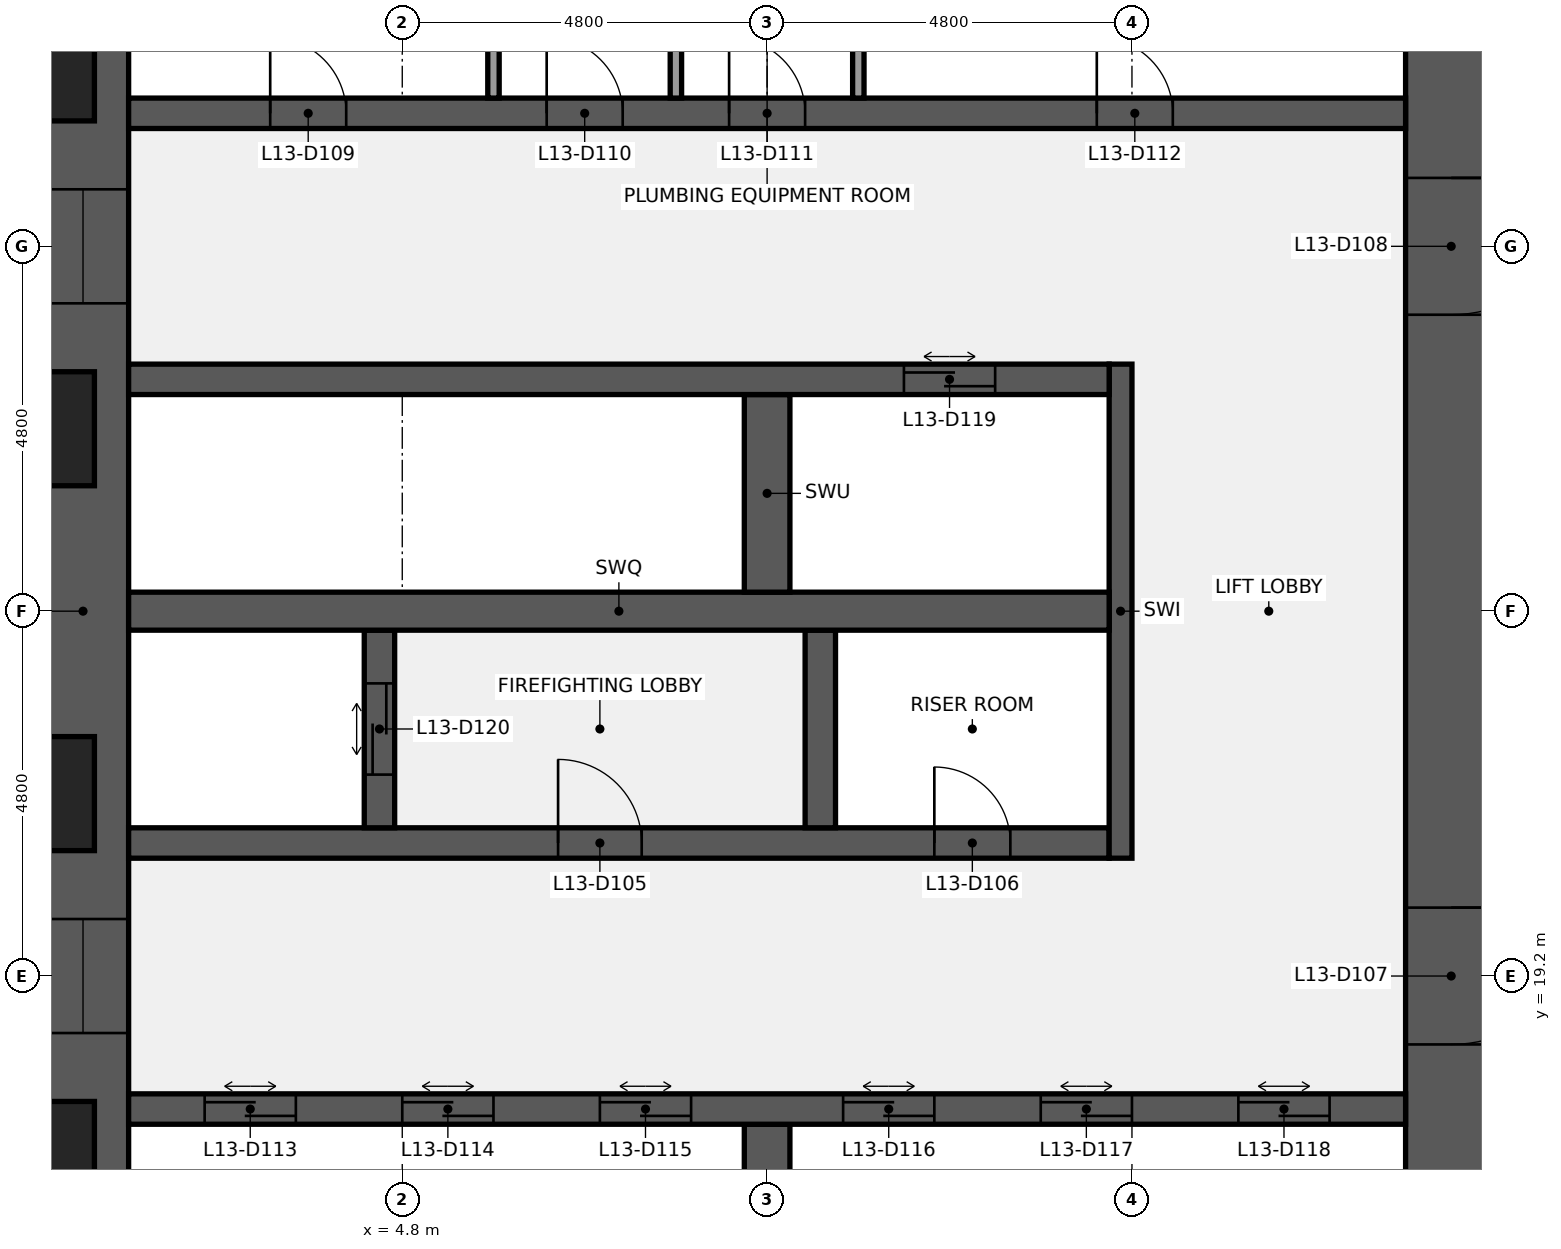
"""IFC4 building model, lengths in metres.
Left out: names, types, materials, properties, quantities, classifications, styles, units other than length and angle.
Written with IfcOpenShell. Run it as: python <this file> out.ifc"""

import sys

from ifc_helpers import new_model, si_unit, direction, frame, frame_2d, origin, place, context, subcontext, project, spatial, rectangle, extrude, element, fill, save


model = new_model("IFC4")
c1 = context("Model", 3, precision=1e-05, world=origin(), true_north=direction((0.0, 1.0)))
c2 = subcontext(c1, "Body", "Model", "MODEL_VIEW")
j1 = project(units=[si_unit("LENGTHUNIT", "METRE"), si_unit("PLANEANGLEUNIT", "RADIAN")], contexts=[c1])
p1 = place(None, origin())
s1 = spatial("IfcSite", under=j1, at=p1, CompositionType="ELEMENT")
p2 = place(p1, origin())
s2 = spatial("IfcBuilding", under=s1, at=p2, CompositionType="ELEMENT")
p3 = place(p2, frame((0.0, 0.0, 63.0)))
s3 = spatial("IfcBuildingStorey", under=s2, at=p3, CompositionType="ELEMENT", Elevation=63.0)
p4 = place(p3, frame((0.6, 9.6, 0.0), z_axis=(0.0, 0.0, 1.0), x_axis=(0.0, 1.0, 0.0)))
e1 = element("IfcWall", 1, at=p4, inside=s3, PredefinedType="SHEAR", context=c2, shape_type="SweptSolid", body=[
    extrude(rectangle(XDim=28.8, YDim=1.2, at=frame_2d((14.4, 0.0))), origin(), (0.0, 0.0, 1.0), 3.84),
])
p5 = place(p4, frame((8.85, 0.0, 0.9)))
e2 = element("IfcOpeningElement", 2, at=p5, cuts=e1, PredefinedType="OPENING", context=c2, shape_type="SweptSolid", body=[
    extrude(rectangle(XDim=1.5, YDim=1.5, at=frame_2d((0.75, 0.75))), frame((0.0, 0.61, 0.0), z_axis=(0.0, -1.0, 0.0), x_axis=(1.0, 0.0, 0.0)), (0.0, 0.0, 1.0), 1.22),
])
p6 = place(p4, frame((18.45, 0.0, 0.9)))
e3 = element("IfcOpeningElement", 3, at=p6, cuts=e1, PredefinedType="OPENING", context=c2, shape_type="SweptSolid", body=[
    extrude(rectangle(XDim=1.5, YDim=1.5, at=frame_2d((0.75, 0.75))), frame((0.0, 0.61, 0.0), z_axis=(0.0, -1.0, 0.0), x_axis=(1.0, 0.0, 0.0)), (0.0, 0.0, 1.0), 1.22),
])
p7 = place(p3, frame((18.6, 38.4, 0.0), z_axis=(0.0, 0.0, 1.0), x_axis=(0.0, -1.0, 0.0)))
e4 = element("IfcWall", 4, at=p7, inside=s3, PredefinedType="SHEAR", context=c2, shape_type="SweptSolid", body=[
    extrude(rectangle(XDim=28.8, YDim=1.2, at=frame_2d((14.4, 0.0))), origin(), (0.0, 0.0, 1.0), 3.84),
])
p8 = place(p7, frame((18.3, 0.0, 0.0)))
e5 = element("IfcOpeningElement", 5, at=p8, cuts=e4, PredefinedType="OPENING", context=c2, shape_type="SweptSolid", body=[
    extrude(rectangle(XDim=1.8, YDim=2.1, at=frame_2d((0.9, 1.05))), frame((0.0, 0.61, 0.0), z_axis=(0.0, -1.0, 0.0), x_axis=(1.0, 0.0, 0.0)), (0.0, 0.0, 1.0), 1.22),
])
p9 = place(p7, frame((8.7, 0.0, 0.0)))
e6 = element("IfcOpeningElement", 6, at=p9, cuts=e4, PredefinedType="OPENING", context=c2, shape_type="SweptSolid", body=[
    extrude(rectangle(XDim=1.8, YDim=2.1, at=frame_2d((0.9, 1.05))), frame((0.0, 0.61, 0.0), z_axis=(0.0, -1.0, 0.0), x_axis=(1.0, 0.0, 0.0)), (0.0, 0.0, 1.0), 1.22),
])
p10 = place(p3, frame((9.6, 14.65, 0.0), z_axis=(0.0, 0.0, 1.0), x_axis=(0.0, 1.0, 0.0)))
e7 = element("IfcWall", 7, at=p10, inside=s3, PredefinedType="SHEAR", context=c2, shape_type="SweptSolid", body=[
    extrude(rectangle(XDim=2.6, YDim=0.6, at=frame_2d((1.3, 0.0))), origin(), (0.0, 0.0, 1.0), 3.84),
])
p11 = place(p3, frame((1.2, 17.45, 0.0), z_axis=(0.0, 0.0, 1.0), x_axis=(1.0, 0.0, 0.0)))
e8 = element("IfcWall", 8, at=p11, inside=s3, PredefinedType="SHEAR", context=c2, shape_type="SweptSolid", body=[
    extrude(rectangle(XDim=16.8, YDim=0.4, at=frame_2d((8.4, 0.0))), origin(), (0.0, 0.0, 1.0), 3.84),
])
p12 = place(p11, frame((1.0, 0.0, 0.0)))
e9 = element("IfcOpeningElement", 9, at=p12, cuts=e8, PredefinedType="OPENING", context=c2, shape_type="SweptSolid", body=[
    extrude(rectangle(XDim=1.2, YDim=2.1, at=frame_2d((0.6, 1.05))), frame((0.0, 0.21, 0.0), z_axis=(0.0, -1.0, 0.0), x_axis=(1.0, 0.0, 0.0)), (0.0, 0.0, 1.0), 0.42),
])
p13 = place(p11, frame((3.6, 0.0, 0.0)))
e10 = element("IfcOpeningElement", 10, at=p13, cuts=e8, PredefinedType="OPENING", context=c2, shape_type="SweptSolid", body=[
    extrude(rectangle(XDim=1.2, YDim=2.1, at=frame_2d((0.6, 1.05))), frame((0.0, 0.21, 0.0), z_axis=(0.0, -1.0, 0.0), x_axis=(1.0, 0.0, 0.0)), (0.0, 0.0, 1.0), 0.42),
])
p14 = place(p11, frame((6.2, 0.0, 0.0)))
e11 = element("IfcOpeningElement", 11, at=p14, cuts=e8, PredefinedType="OPENING", context=c2, shape_type="SweptSolid", body=[
    extrude(rectangle(XDim=1.2, YDim=2.1, at=frame_2d((0.6, 1.05))), frame((0.0, 0.21, 0.0), z_axis=(0.0, -1.0, 0.0), x_axis=(1.0, 0.0, 0.0)), (0.0, 0.0, 1.0), 0.42),
])
p15 = place(p11, frame((9.4, 0.0, 0.0)))
e12 = element("IfcOpeningElement", 12, at=p15, cuts=e8, PredefinedType="OPENING", context=c2, shape_type="SweptSolid", body=[
    extrude(rectangle(XDim=1.2, YDim=2.1, at=frame_2d((0.6, 1.05))), frame((0.0, 0.21, 0.0), z_axis=(0.0, -1.0, 0.0), x_axis=(1.0, 0.0, 0.0)), (0.0, 0.0, 1.0), 0.42),
])
p16 = place(p11, frame((12.0, 0.0, 0.0)))
e13 = element("IfcOpeningElement", 13, at=p16, cuts=e8, PredefinedType="OPENING", context=c2, shape_type="SweptSolid", body=[
    extrude(rectangle(XDim=1.2, YDim=2.1, at=frame_2d((0.6, 1.05))), frame((0.0, 0.21, 0.0), z_axis=(0.0, -1.0, 0.0), x_axis=(1.0, 0.0, 0.0)), (0.0, 0.0, 1.0), 0.42),
])
p17 = place(p11, frame((14.6, 0.0, 0.0)))
e14 = element("IfcOpeningElement", 14, at=p17, cuts=e8, PredefinedType="OPENING", context=c2, shape_type="SweptSolid", body=[
    extrude(rectangle(XDim=1.2, YDim=2.1, at=frame_2d((0.6, 1.05))), frame((0.0, 0.21, 0.0), z_axis=(0.0, -1.0, 0.0), x_axis=(1.0, 0.0, 0.0)), (0.0, 0.0, 1.0), 0.42),
])
p18 = place(p3, frame((1.2, 20.95, 0.0), z_axis=(0.0, 0.0, 1.0), x_axis=(1.0, 0.0, 0.0)))
e15 = element("IfcWall", 15, at=p18, inside=s3, PredefinedType="SHEAR", context=c2, shape_type="SweptSolid", body=[
    extrude(rectangle(XDim=12.9, YDim=0.4, at=frame_2d((6.45, 0.0))), origin(), (0.0, 0.0, 1.0), 3.84),
])
p19 = place(p18, frame((5.65, 0.0, 0.0)))
e16 = element("IfcOpeningElement", 16, at=p19, cuts=e15, PredefinedType="OPENING", context=c2, shape_type="SweptSolid", body=[
    extrude(rectangle(XDim=1.1, YDim=2.1, at=frame_2d((0.55, 1.05))), frame((0.0, 0.21, 0.0), z_axis=(0.0, -1.0, 0.0), x_axis=(1.0, 0.0, 0.0)), (0.0, 0.0, 1.0), 0.42),
])
p20 = place(p18, frame((10.6, 0.0, 0.0)))
e17 = element("IfcOpeningElement", 17, at=p20, cuts=e15, PredefinedType="OPENING", context=c2, shape_type="SweptSolid", body=[
    extrude(rectangle(XDim=1.0, YDim=2.1, at=frame_2d((0.5, 1.05))), frame((0.0, 0.21, 0.0), z_axis=(0.0, -1.0, 0.0), x_axis=(1.0, 0.0, 0.0)), (0.0, 0.0, 1.0), 0.42),
])
p21 = place(p3, frame((14.25, 20.75, 0.0), z_axis=(0.0, 0.0, 1.0), x_axis=(0.0, 1.0, 0.0)))
e18 = element("IfcWall", 18, at=p21, inside=s3, PredefinedType="SHEAR", context=c2, shape_type="SweptSolid", body=[
    extrude(rectangle(XDim=6.5, YDim=0.3, at=frame_2d((3.25, 0.0))), origin(), (0.0, 0.0, 1.0), 3.84),
])
p22 = place(p3, frame((4.5, 21.15, 0.0), z_axis=(0.0, 0.0, 1.0), x_axis=(0.0, 1.0, 0.0)))
e19 = element("IfcWall", 19, at=p22, inside=s3, PredefinedType="SHEAR", context=c2, shape_type="SweptSolid", body=[
    extrude(rectangle(XDim=2.6, YDim=0.4, at=frame_2d((1.3, 0.0))), origin(), (0.0, 0.0, 1.0), 3.84),
])
p23 = place(p22, frame((0.7, 0.0, 0.0)))
e20 = element("IfcOpeningElement", 20, at=p23, cuts=e19, PredefinedType="OPENING", context=c2, shape_type="SweptSolid", body=[
    extrude(rectangle(XDim=1.2, YDim=2.1, at=frame_2d((0.6, 1.05))), frame((0.0, 0.21, 0.0), z_axis=(0.0, -1.0, 0.0), x_axis=(1.0, 0.0, 0.0)), (0.0, 0.0, 1.0), 0.42),
])
p24 = place(p3, frame((10.3, 21.15, 0.0), z_axis=(0.0, 0.0, 1.0), x_axis=(0.0, 1.0, 0.0)))
e21 = element("IfcWall", 21, at=p24, inside=s3, PredefinedType="SHEAR", context=c2, shape_type="SweptSolid", body=[
    extrude(rectangle(XDim=2.6, YDim=0.4, at=frame_2d((1.3, 0.0))), origin(), (0.0, 0.0, 1.0), 3.84),
])
p25 = place(p3, frame((1.2, 24.0, 0.0), z_axis=(0.0, 0.0, 1.0), x_axis=(1.0, 0.0, 0.0)))
e22 = element("IfcWall", 22, at=p25, inside=s3, PredefinedType="SHEAR", context=c2, shape_type="SweptSolid", body=[
    extrude(rectangle(XDim=12.9, YDim=0.5, at=frame_2d((6.45, 0.0))), origin(), (0.0, 0.0, 1.0), 3.84),
])
p26 = place(p3, frame((9.6, 24.25, 0.0), z_axis=(0.0, 0.0, 1.0), x_axis=(0.0, 1.0, 0.0)))
e23 = element("IfcWall", 23, at=p26, inside=s3, PredefinedType="SHEAR", context=c2, shape_type="SweptSolid", body=[
    extrude(rectangle(XDim=2.6, YDim=0.6, at=frame_2d((1.3, 0.0))), origin(), (0.0, 0.0, 1.0), 3.84),
])
p27 = place(p3, frame((1.2, 27.05, 0.0), z_axis=(0.0, 0.0, 1.0), x_axis=(1.0, 0.0, 0.0)))
e24 = element("IfcWall", 24, at=p27, inside=s3, PredefinedType="SHEAR", context=c2, shape_type="SweptSolid", body=[
    extrude(rectangle(XDim=12.9, YDim=0.4, at=frame_2d((6.45, 0.0))), origin(), (0.0, 0.0, 1.0), 3.84),
])
p28 = place(p27, frame((10.2, 0.0, 0.0)))
e25 = element("IfcOpeningElement", 25, at=p28, cuts=e24, PredefinedType="OPENING", context=c2, shape_type="SweptSolid", body=[
    extrude(rectangle(XDim=1.2, YDim=2.1, at=frame_2d((0.6, 1.05))), frame((0.0, 0.21, 0.0), z_axis=(0.0, -1.0, 0.0), x_axis=(1.0, 0.0, 0.0)), (0.0, 0.0, 1.0), 0.42),
])
p29 = place(p3, frame((1.2, 30.55, 0.0), z_axis=(0.0, 0.0, 1.0), x_axis=(1.0, 0.0, 0.0)))
e26 = element("IfcWall", 26, at=p29, inside=s3, PredefinedType="SHEAR", context=c2, shape_type="SweptSolid", body=[
    extrude(rectangle(XDim=16.8, YDim=0.4, at=frame_2d((8.4, 0.0))), origin(), (0.0, 0.0, 1.0), 3.84),
])
p30 = place(p29, frame((1.863, 0.0, 0.0)))
e27 = element("IfcOpeningElement", 27, at=p30, cuts=e26, PredefinedType="OPENING", context=c2, shape_type="SweptSolid", body=[
    extrude(rectangle(XDim=1.0, YDim=2.1, at=frame_2d((0.5, 1.05))), frame((0.0, 0.21, 0.0), z_axis=(0.0, -1.0, 0.0), x_axis=(1.0, 0.0, 0.0)), (0.0, 0.0, 1.0), 0.42),
])
p31 = place(p29, frame((5.5, 0.0, 0.0)))
e28 = element("IfcOpeningElement", 28, at=p31, cuts=e26, PredefinedType="OPENING", context=c2, shape_type="SweptSolid", body=[
    extrude(rectangle(XDim=1.0, YDim=2.1, at=frame_2d((0.5, 1.05))), frame((0.0, 0.21, 0.0), z_axis=(0.0, -1.0, 0.0), x_axis=(1.0, 0.0, 0.0)), (0.0, 0.0, 1.0), 0.42),
])
p32 = place(p29, frame((7.9, 0.0, 0.0)))
e29 = element("IfcOpeningElement", 29, at=p32, cuts=e26, PredefinedType="OPENING", context=c2, shape_type="SweptSolid", body=[
    extrude(rectangle(XDim=1.0, YDim=2.1, at=frame_2d((0.5, 1.05))), frame((0.0, 0.21, 0.0), z_axis=(0.0, -1.0, 0.0), x_axis=(1.0, 0.0, 0.0)), (0.0, 0.0, 1.0), 0.42),
])
p33 = place(p29, frame((12.738, 0.0, 0.0)))
e30 = element("IfcOpeningElement", 30, at=p33, cuts=e26, PredefinedType="OPENING", context=c2, shape_type="SweptSolid", body=[
    extrude(rectangle(XDim=1.0, YDim=2.1, at=frame_2d((0.5, 1.05))), frame((0.0, 0.21, 0.0), z_axis=(0.0, -1.0, 0.0), x_axis=(1.0, 0.0, 0.0)), (0.0, 0.0, 1.0), 0.42),
])
for number, where, z_axis, x_axis in (
    (31, (6.0, 30.75, 0.0), (0.0, 0.0, 1.0), (0.0, 1.0, 0.0)),
    (32, (8.4, 30.75, 0.0), (0.0, 0.0, 1.0), (0.0, 1.0, 0.0)),
    (33, (10.8, 30.75, 0.0), (0.0, 0.0, 1.0), (0.0, 1.0, 0.0)),
):
    element("IfcWall", number, at=place(p3, frame(where, z_axis=z_axis, x_axis=x_axis)), inside=s3, PredefinedType="PARTITIONING", context=c2, shape_type="SweptSolid", body=[
        extrude(rectangle(XDim=2.6, YDim=0.15, at=frame_2d((1.3, 0.0))), origin(), (0.0, 0.0, 1.0), 3.84),
    ])
p34 = place(p19, origin())
e34 = element("IfcDoor", 34, at=p34, inside=s3, OperationType="SINGLE_SWING_LEFT", PredefinedType="DOOR", context=c2, shape_type="SweptSolid", body=[
    extrude(rectangle(XDim=1.1, YDim=2.1, at=frame_2d((0.55, 1.05))), frame((0.0, 0.025, 0.0), z_axis=(0.0, -1.0, 0.0), x_axis=(1.0, 0.0, 0.0)), (0.0, 0.0, 1.0), 0.05),
])
fill(e16, e34)
p35 = place(p20, origin())
e35 = element("IfcDoor", 35, at=p35, inside=s3, OperationType="SINGLE_SWING_LEFT", PredefinedType="DOOR", context=c2, shape_type="SweptSolid", body=[
    extrude(rectangle(XDim=1.0, YDim=2.1, at=frame_2d((0.5, 1.05))), frame((0.0, 0.025, 0.0), z_axis=(0.0, -1.0, 0.0), x_axis=(1.0, 0.0, 0.0)), (0.0, 0.0, 1.0), 0.05),
])
fill(e17, e35)
p36 = place(p8, origin())
e36 = element("IfcDoor", 36, at=p36, inside=s3, OperationType="DOUBLE_DOOR_SINGLE_SWING", PredefinedType="DOOR", context=c2, shape_type="SweptSolid", body=[
    extrude(rectangle(XDim=1.8, YDim=2.1, at=frame_2d((0.9, 1.05))), frame((0.0, 0.025, 0.0), z_axis=(0.0, -1.0, 0.0), x_axis=(1.0, 0.0, 0.0)), (0.0, 0.0, 1.0), 0.05),
])
fill(e5, e36)
p37 = place(p9, origin())
e37 = element("IfcDoor", 37, at=p37, inside=s3, OperationType="DOUBLE_DOOR_SINGLE_SWING", PredefinedType="DOOR", context=c2, shape_type="SweptSolid", body=[
    extrude(rectangle(XDim=1.8, YDim=2.1, at=frame_2d((0.9, 1.05))), frame((0.0, 0.025, 0.0), z_axis=(0.0, -1.0, 0.0), x_axis=(1.0, 0.0, 0.0)), (0.0, 0.0, 1.0), 0.05),
])
fill(e6, e37)
p38 = place(p30, origin())
e38 = element("IfcDoor", 38, at=p38, inside=s3, OperationType="SINGLE_SWING_LEFT", PredefinedType="DOOR", context=c2, shape_type="SweptSolid", body=[
    extrude(rectangle(XDim=1.0, YDim=2.1, at=frame_2d((0.5, 1.05))), frame((0.0, 0.025, 0.0), z_axis=(0.0, -1.0, 0.0), x_axis=(1.0, 0.0, 0.0)), (0.0, 0.0, 1.0), 0.05),
])
fill(e27, e38)
p39 = place(p31, origin())
e39 = element("IfcDoor", 39, at=p39, inside=s3, OperationType="SINGLE_SWING_LEFT", PredefinedType="DOOR", context=c2, shape_type="SweptSolid", body=[
    extrude(rectangle(XDim=1.0, YDim=2.1, at=frame_2d((0.5, 1.05))), frame((0.0, 0.025, 0.0), z_axis=(0.0, -1.0, 0.0), x_axis=(1.0, 0.0, 0.0)), (0.0, 0.0, 1.0), 0.05),
])
fill(e28, e39)
p40 = place(p32, origin())
e40 = element("IfcDoor", 40, at=p40, inside=s3, OperationType="SINGLE_SWING_LEFT", PredefinedType="DOOR", context=c2, shape_type="SweptSolid", body=[
    extrude(rectangle(XDim=1.0, YDim=2.1, at=frame_2d((0.5, 1.05))), frame((0.0, 0.025, 0.0), z_axis=(0.0, -1.0, 0.0), x_axis=(1.0, 0.0, 0.0)), (0.0, 0.0, 1.0), 0.05),
])
fill(e29, e40)
p41 = place(p33, origin())
e41 = element("IfcDoor", 41, at=p41, inside=s3, OperationType="SINGLE_SWING_LEFT", PredefinedType="DOOR", context=c2, shape_type="SweptSolid", body=[
    extrude(rectangle(XDim=1.0, YDim=2.1, at=frame_2d((0.5, 1.05))), frame((0.0, 0.025, 0.0), z_axis=(0.0, -1.0, 0.0), x_axis=(1.0, 0.0, 0.0)), (0.0, 0.0, 1.0), 0.05),
])
fill(e30, e41)
p42 = place(p12, origin())
e42 = element("IfcDoor", 42, at=p42, inside=s3, OperationType="DOUBLE_DOOR_SLIDING", PredefinedType="DOOR", context=c2, shape_type="SweptSolid", body=[
    extrude(rectangle(XDim=1.2, YDim=2.1, at=frame_2d((0.6, 1.05))), frame((0.0, 0.025, 0.0), z_axis=(0.0, -1.0, 0.0), x_axis=(1.0, 0.0, 0.0)), (0.0, 0.0, 1.0), 0.05),
])
fill(e9, e42)
p43 = place(p13, origin())
e43 = element("IfcDoor", 43, at=p43, inside=s3, OperationType="DOUBLE_DOOR_SLIDING", PredefinedType="DOOR", context=c2, shape_type="SweptSolid", body=[
    extrude(rectangle(XDim=1.2, YDim=2.1, at=frame_2d((0.6, 1.05))), frame((0.0, 0.025, 0.0), z_axis=(0.0, -1.0, 0.0), x_axis=(1.0, 0.0, 0.0)), (0.0, 0.0, 1.0), 0.05),
])
fill(e10, e43)
p44 = place(p14, origin())
e44 = element("IfcDoor", 44, at=p44, inside=s3, OperationType="DOUBLE_DOOR_SLIDING", PredefinedType="DOOR", context=c2, shape_type="SweptSolid", body=[
    extrude(rectangle(XDim=1.2, YDim=2.1, at=frame_2d((0.6, 1.05))), frame((0.0, 0.025, 0.0), z_axis=(0.0, -1.0, 0.0), x_axis=(1.0, 0.0, 0.0)), (0.0, 0.0, 1.0), 0.05),
])
fill(e11, e44)
p45 = place(p15, origin())
e45 = element("IfcDoor", 45, at=p45, inside=s3, OperationType="DOUBLE_DOOR_SLIDING", PredefinedType="DOOR", context=c2, shape_type="SweptSolid", body=[
    extrude(rectangle(XDim=1.2, YDim=2.1, at=frame_2d((0.6, 1.05))), frame((0.0, 0.025, 0.0), z_axis=(0.0, -1.0, 0.0), x_axis=(1.0, 0.0, 0.0)), (0.0, 0.0, 1.0), 0.05),
])
fill(e12, e45)
p46 = place(p16, origin())
e46 = element("IfcDoor", 46, at=p46, inside=s3, OperationType="DOUBLE_DOOR_SLIDING", PredefinedType="DOOR", context=c2, shape_type="SweptSolid", body=[
    extrude(rectangle(XDim=1.2, YDim=2.1, at=frame_2d((0.6, 1.05))), frame((0.0, 0.025, 0.0), z_axis=(0.0, -1.0, 0.0), x_axis=(1.0, 0.0, 0.0)), (0.0, 0.0, 1.0), 0.05),
])
fill(e13, e46)
p47 = place(p17, origin())
e47 = element("IfcDoor", 47, at=p47, inside=s3, OperationType="DOUBLE_DOOR_SLIDING", PredefinedType="DOOR", context=c2, shape_type="SweptSolid", body=[
    extrude(rectangle(XDim=1.2, YDim=2.1, at=frame_2d((0.6, 1.05))), frame((0.0, 0.025, 0.0), z_axis=(0.0, -1.0, 0.0), x_axis=(1.0, 0.0, 0.0)), (0.0, 0.0, 1.0), 0.05),
])
fill(e14, e47)
p48 = place(p28, origin())
e48 = element("IfcDoor", 48, at=p48, inside=s3, OperationType="DOUBLE_DOOR_SLIDING", PredefinedType="DOOR", context=c2, shape_type="SweptSolid", body=[
    extrude(rectangle(XDim=1.2, YDim=2.1, at=frame_2d((0.6, 1.05))), frame((0.0, 0.025, 0.0), z_axis=(0.0, -1.0, 0.0), x_axis=(1.0, 0.0, 0.0)), (0.0, 0.0, 1.0), 0.05),
])
fill(e25, e48)
p49 = place(p23, origin())
e49 = element("IfcDoor", 49, at=p49, inside=s3, OperationType="DOUBLE_DOOR_SLIDING", PredefinedType="DOOR", context=c2, shape_type="SweptSolid", body=[
    extrude(rectangle(XDim=1.2, YDim=2.1, at=frame_2d((0.6, 1.05))), frame((0.0, 0.025, 0.0), z_axis=(0.0, -1.0, 0.0), x_axis=(1.0, 0.0, 0.0)), (0.0, 0.0, 1.0), 0.05),
])
fill(e20, e49)
p50 = place(p5, origin())
e50 = element("IfcWindow", 50, at=p50, inside=s3, PartitioningType="SINGLE_PANEL", PredefinedType="WINDOW", context=c2, shape_type="SweptSolid", body=[
    extrude(rectangle(XDim=1.5, YDim=1.5, at=frame_2d((0.75, 0.75))), frame((0.0, 0.03, 0.0), z_axis=(0.0, -1.0, 0.0), x_axis=(1.0, 0.0, 0.0)), (0.0, 0.0, 1.0), 0.06),
])
fill(e2, e50)
p51 = place(p6, origin())
e51 = element("IfcWindow", 51, at=p51, inside=s3, PartitioningType="SINGLE_PANEL", PredefinedType="WINDOW", context=c2, shape_type="SweptSolid", body=[
    extrude(rectangle(XDim=1.5, YDim=1.5, at=frame_2d((0.75, 0.75))), frame((0.0, 0.03, 0.0), z_axis=(0.0, -1.0, 0.0), x_axis=(1.0, 0.0, 0.0)), (0.0, 0.0, 1.0), 0.06),
])
fill(e3, e51)
save(model, sys.argv[1])
